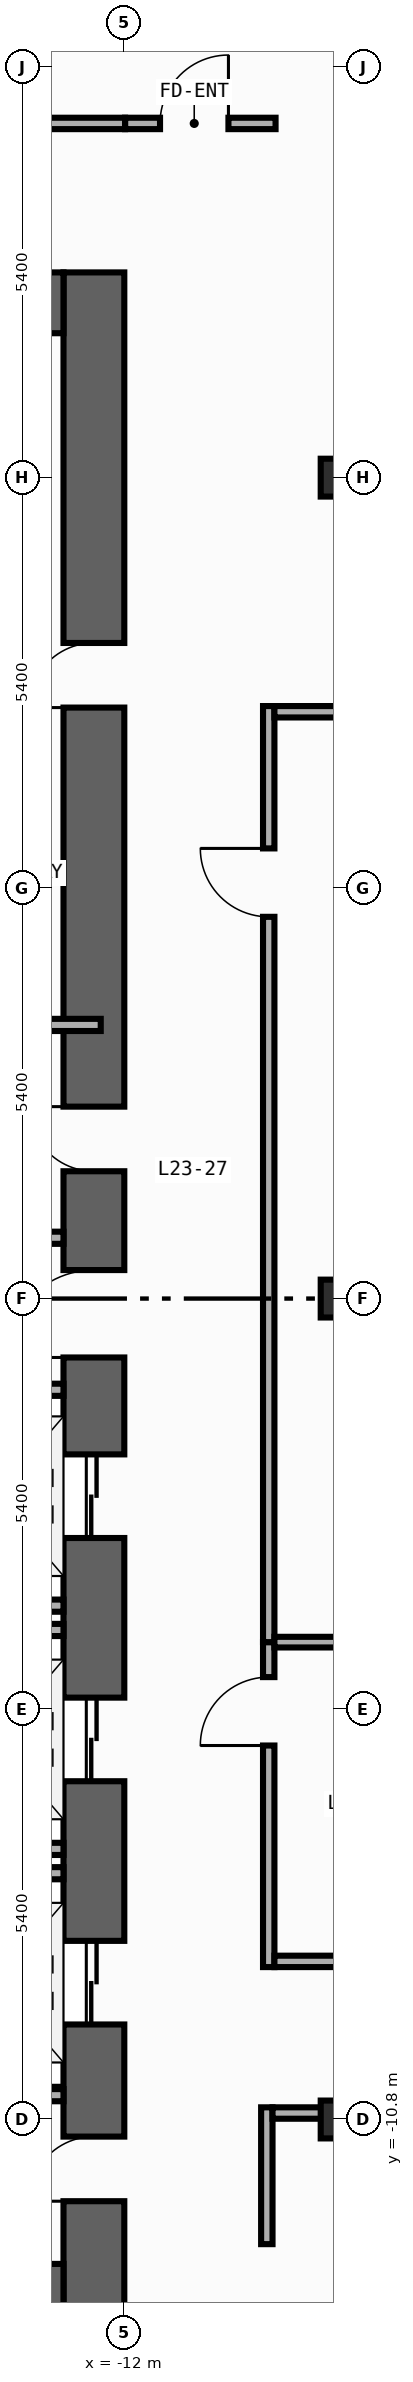
"""IFC4 building model, lengths in metres.
Left out: names, types, materials, properties, quantities, classifications, styles, units other than length and angle.
Written with IfcOpenShell. Run it as: python <this file> out.ifc"""

import sys

from ifc_helpers import new_model, si_unit, direction, frame, frame_2d, origin, origin_2d, place, context, subcontext, project, spatial, rectangle, i_section, extrude, element, fill, save


model = new_model("IFC4")
c1 = context("Model", 3, precision=1e-05, world=origin(), true_north=direction((0.0, 1.0)))
c2 = subcontext(c1, "Body", "Model", "MODEL_VIEW")
j1 = project(units=[si_unit("LENGTHUNIT", "METRE"), si_unit("PLANEANGLEUNIT", "RADIAN")], contexts=[c1])
p1 = place(None, origin())
s1 = spatial("IfcSite", under=j1, at=p1, CompositionType="ELEMENT")
p2 = place(p1, origin())
s2 = spatial("IfcBuilding", under=s1, at=p2, CompositionType="ELEMENT")
p3 = place(p2, frame((0.0, 0.0, 101.6)))
s3 = spatial("IfcBuildingStorey", under=s2, at=p3, CompositionType="ELEMENT", Elevation=101.6)
p4 = place(p3, frame((-12.4, -13.5, 0.0), z_axis=(0.0, 0.0, 1.0), x_axis=(0.0, 1.0, 0.0)))
e1 = element("IfcWall", 1, at=p4, inside=s3, PredefinedType="SHEAR", context=c2, shape_type="SweptSolid", body=[
    extrude(rectangle(XDim=27.0, YDim=0.8, at=frame_2d((13.5, 0.0))), origin(), (0.0, 0.0, 1.0), 3.94),
])
p5 = place(p4, frame((10.35, 0.0, 0.0)))
e2 = element("IfcOpeningElement", 2, at=p5, cuts=e1, PredefinedType="OPENING", context=c2, shape_type="SweptSolid", body=[
    extrude(rectangle(XDim=1.1, YDim=2.2, at=frame_2d((0.55, 1.1))), frame((0.0, 0.41, 0.0), z_axis=(0.0, -1.0, 0.0), x_axis=(1.0, 0.0, 0.0)), (0.0, 0.0, 1.0), 0.82),
])
p6 = place(p4, frame((7.15, 0.0, 0.0)))
e3 = element("IfcOpeningElement", 3, at=p6, cuts=e1, PredefinedType="OPENING", context=c2, shape_type="SweptSolid", body=[
    extrude(rectangle(XDim=1.1, YDim=2.2, at=frame_2d((0.55, 1.1))), frame((0.0, 0.41, 0.0), z_axis=(0.0, -1.0, 0.0), x_axis=(1.0, 0.0, 0.0)), (0.0, 0.0, 1.0), 0.82),
])
p7 = place(p4, frame((3.95, 0.0, 0.0)))
e4 = element("IfcOpeningElement", 4, at=p7, cuts=e1, PredefinedType="OPENING", context=c2, shape_type="SweptSolid", body=[
    extrude(rectangle(XDim=1.1, YDim=2.2, at=frame_2d((0.55, 1.1))), frame((0.0, 0.41, 0.0), z_axis=(0.0, -1.0, 0.0), x_axis=(1.0, 0.0, 0.0)), (0.0, 0.0, 1.0), 0.82),
])
p8 = place(p4, frame((15.175, 0.0, 0.0)))
e5 = element("IfcOpeningElement", 5, at=p8, cuts=e1, PredefinedType="OPENING", context=c2, shape_type="SweptSolid", body=[
    extrude(rectangle(XDim=0.85, YDim=2.1, at=frame_2d((0.425, 1.05))), frame((0.0, 0.41, 0.0), z_axis=(0.0, -1.0, 0.0), x_axis=(1.0, 0.0, 0.0)), (0.0, 0.0, 1.0), 0.82),
])
p9 = place(p4, frame((21.275, 0.0, 0.0)))
e6 = element("IfcOpeningElement", 6, at=p9, cuts=e1, PredefinedType="OPENING", context=c2, shape_type="SweptSolid", body=[
    extrude(rectangle(XDim=0.85, YDim=2.1, at=frame_2d((0.425, 1.05))), frame((0.0, 0.41, 0.0), z_axis=(0.0, -1.0, 0.0), x_axis=(1.0, 0.0, 0.0)), (0.0, 0.0, 1.0), 0.82),
])
p10 = place(p4, frame((12.725, 0.0, 0.0)))
e7 = element("IfcOpeningElement", 7, at=p10, cuts=e1, PredefinedType="OPENING", context=c2, shape_type="SweptSolid", body=[
    extrude(rectangle(XDim=1.15, YDim=2.2, at=frame_2d((0.575, 1.1))), frame((0.0, 0.41, 0.0), z_axis=(0.0, -1.0, 0.0), x_axis=(1.0, 0.0, 0.0)), (0.0, 0.0, 1.0), 0.82),
])
p11 = place(p4, frame((1.625, 0.0, 0.0)))
e8 = element("IfcOpeningElement", 8, at=p11, cuts=e1, PredefinedType="OPENING", context=c2, shape_type="SweptSolid", body=[
    extrude(rectangle(XDim=0.85, YDim=2.1, at=frame_2d((0.425, 1.05))), frame((0.0, 0.41, 0.0), z_axis=(0.0, -1.0, 0.0), x_axis=(1.0, 0.0, 0.0)), (0.0, 0.0, 1.0), 0.82),
])
for number, where, z_axis, x_axis in (
    (9, (-19.6, -13.1, 0.0), (0.0, 0.0, 1.0), (1.0, 0.0, 0.0)),
    (10, (-19.6, 13.1, 0.0), (0.0, 0.0, 1.0), (1.0, 0.0, 0.0)),
):
    element("IfcWall", number, at=place(p3, frame(where, z_axis=z_axis, x_axis=x_axis)), inside=s3, PredefinedType="SHEAR", context=c2, shape_type="SweptSolid", body=[
        extrude(rectangle(XDim=6.8, YDim=0.8, at=frame_2d((3.4, 0.0))), origin(), (0.0, 0.0, 1.0), 3.94),
    ])
for number, where, z_axis, x_axis in (
    (11, (-9.2, -10.8, 0.0), (0.0, 0.0, 1.0), (1.0, 0.0, 0.0)),
    (12, (-9.2, 0.0, 0.0), (0.0, 0.0, 1.0), (1.0, 0.0, 0.0)),
    (13, (-9.2, 10.8, 0.0), (0.0, 0.0, 1.0), (1.0, 0.0, 0.0)),
):
    element("IfcColumn", number, at=place(p3, frame(where, z_axis=z_axis, x_axis=x_axis)), inside=s3, PredefinedType="COLUMN", context=c2, shape_type="SweptSolid", body=[
        extrude(i_section(OverallWidth=0.432, OverallDepth=0.498, WebThickness=0.045, FlangeThickness=0.07, FilletRadius=0.022, at=origin_2d()), origin(), (0.0, 0.0, 1.0), 4.2),
    ])
for number, where, z_axis, x_axis in (
    (14, (-14.99, -4.04, 0.0), (0.0, 0.0, 1.0), (1.0, 0.0, 0.0)),
    (15, (-14.99, -7.24, 0.0), (0.0, 0.0, 1.0), (1.0, 0.0, 0.0)),
    (16, (-14.99, -4.36, 0.0), (0.0, 0.0, 1.0), (1.0, 0.0, 0.0)),
    (17, (-14.99, -7.56, 0.0), (0.0, 0.0, 1.0), (1.0, 0.0, 0.0)),
):
    element("IfcWall", number, at=place(p3, frame(where, z_axis=z_axis, x_axis=x_axis)), inside=s3, PredefinedType="STANDARD", context=c2, shape_type="SweptSolid", body=[
        extrude(rectangle(XDim=2.19, YDim=0.16, at=frame_2d((1.095, 0.0))), origin(), (0.0, 0.0, 1.0), 3.94),
    ])
for number, where, z_axis, x_axis in (
    (18, (-15.4, 0.8, 0.0), (0.0, 0.0, 1.0), (1.0, 0.0, 0.0)),
    (19, (-15.4, -1.2, 0.0), (0.0, 0.0, 1.0), (1.0, 0.0, 0.0)),
    (20, (-15.4, -10.48, 0.0), (0.0, 0.0, 1.0), (1.0, 0.0, 0.0)),
):
    element("IfcWall", number, at=place(p3, frame(where, z_axis=z_axis, x_axis=x_axis)), inside=s3, PredefinedType="STANDARD", context=c2, shape_type="SweptSolid", body=[
        extrude(rectangle(XDim=2.6, YDim=0.16, at=frame_2d((1.3, 0.0))), origin(), (0.0, 0.0, 1.0), 3.94),
    ])
p12 = place(p3, frame((-15.375, 3.6, 0.0), z_axis=(0.0, 0.0, 1.0), x_axis=(1.0, 0.0, 0.0)))
e21 = element("IfcWall", 21, at=p12, inside=s3, PredefinedType="PARTITIONING", context=c2, shape_type="SweptSolid", body=[
    extrude(rectangle(XDim=3.065, YDim=0.16, at=frame_2d((1.532, 0.0))), origin(), (0.0, 0.0, 1.0), 3.94),
])
p13 = place(p3, frame((-11.99, 15.46, 0.0), z_axis=(0.0, 0.0, 1.0), x_axis=(1.0, 0.0, 0.0)))
e22 = element("IfcWall", 22, at=p13, inside=s3, PredefinedType="PARTITIONING", context=c2, shape_type="SweptSolid", body=[
    extrude(rectangle(XDim=1.98, YDim=0.15, at=frame_2d((0.99, 0.0))), origin(), (0.0, 0.0, 1.0), 3.94),
])
p14 = place(p13, frame((0.46, 0.0, 0.0)))
e23 = element("IfcOpeningElement", 23, at=p14, cuts=e22, PredefinedType="OPENING", context=c2, shape_type="SweptSolid", body=[
    extrude(rectangle(XDim=0.9, YDim=2.15, at=frame_2d((0.45, 1.075))), frame((0.0, 0.085, 0.0), z_axis=(0.0, -1.0, 0.0), x_axis=(1.0, 0.0, 0.0)), (0.0, 0.0, 1.0), 0.17),
])
p15 = place(p3, frame((-10.1, -8.795, 0.0), z_axis=(0.0, 0.0, 1.0), x_axis=(0.0, 1.0, 0.0)))
e24 = element("IfcWall", 24, at=p15, inside=s3, PredefinedType="PARTITIONING", context=c2, shape_type="SweptSolid", body=[
    extrude(rectangle(XDim=4.275, YDim=0.15, at=frame_2d((2.137, 0.0))), origin(), (0.0, 0.0, 1.0), 3.94),
])
p16 = place(p15, frame((2.915, 0.0, 0.0)))
e25 = element("IfcOpeningElement", 25, at=p16, cuts=e24, PredefinedType="OPENING", context=c2, shape_type="SweptSolid", body=[
    extrude(rectangle(XDim=0.9, YDim=2.15, at=frame_2d((0.45, 1.075))), frame((0.0, 0.085, 0.0), z_axis=(0.0, -1.0, 0.0), x_axis=(1.0, 0.0, 0.0)), (0.0, 0.0, 1.0), 0.17),
])
p17 = place(p3, frame((-10.1, -4.52, 0.0), z_axis=(0.0, 0.0, 1.0), x_axis=(0.0, 1.0, 0.0)))
e26 = element("IfcWall", 26, at=p17, inside=s3, PredefinedType="PARTITIONING", context=c2, shape_type="SweptSolid", body=[
    extrude(rectangle(XDim=12.315, YDim=0.15, at=frame_2d((6.157, 0.0))), origin(), (0.0, 0.0, 1.0), 3.94),
])
p18 = place(p17, frame((9.542, 0.0, 0.0)))
e27 = element("IfcOpeningElement", 27, at=p18, cuts=e26, PredefinedType="OPENING", context=c2, shape_type="SweptSolid", body=[
    extrude(rectangle(XDim=0.9, YDim=2.15, at=frame_2d((0.45, 1.075))), frame((0.0, 0.085, 0.0), z_axis=(0.0, -1.0, 0.0), x_axis=(1.0, 0.0, 0.0)), (0.0, 0.0, 1.0), 0.17),
])
p19 = place(p3, frame((-10.125, -12.44, 0.0), z_axis=(0.0, 0.0, 1.0), x_axis=(0.0, 1.0, 0.0)))
e28 = element("IfcWall", 28, at=p19, inside=s3, PredefinedType="PARTITIONING", context=c2, shape_type="SweptSolid", body=[
    extrude(rectangle(XDim=1.8, YDim=0.15, at=frame_2d((0.9, 0.0))), origin(), (0.0, 0.0, 1.0), 3.94),
])
p20 = place(p3, frame((-10.025, 7.72, 0.0), z_axis=(0.0, 0.0, 1.0), x_axis=(1.0, 0.0, 0.0)))
e29 = element("IfcWall", 29, at=p20, inside=s3, PredefinedType="PARTITIONING", context=c2, shape_type="SweptSolid", body=[
    extrude(rectangle(XDim=5.42, YDim=0.15, at=frame_2d((2.71, 0.0))), origin(), (0.0, 0.0, 1.0), 3.94),
])
p21 = place(p20, frame((4.06, 0.0, 0.0)))
e30 = element("IfcOpeningElement", 30, at=p21, cuts=e29, PredefinedType="OPENING", context=c2, shape_type="SweptSolid", body=[
    extrude(rectangle(XDim=0.9, YDim=2.15, at=frame_2d((0.45, 1.075))), frame((0.0, 0.085, 0.0), z_axis=(0.0, -1.0, 0.0), x_axis=(1.0, 0.0, 0.0)), (0.0, 0.0, 1.0), 0.17),
])
p22 = place(p3, frame((-10.025, -8.72, 0.0), z_axis=(0.0, 0.0, 1.0), x_axis=(1.0, 0.0, 0.0)))
e31 = element("IfcWall", 31, at=p22, inside=s3, PredefinedType="PARTITIONING", context=c2, shape_type="SweptSolid", body=[
    extrude(rectangle(XDim=4.465, YDim=0.15, at=frame_2d((2.232, 0.0))), origin(), (0.0, 0.0, 1.0), 3.94),
])
p23 = place(p22, frame((3.105, 0.0, 0.0)))
e32 = element("IfcOpeningElement", 32, at=p23, cuts=e31, PredefinedType="OPENING", context=c2, shape_type="SweptSolid", body=[
    extrude(rectangle(XDim=0.9, YDim=2.15, at=frame_2d((0.45, 1.075))), frame((0.0, 0.085, 0.0), z_axis=(0.0, -1.0, 0.0), x_axis=(1.0, 0.0, 0.0)), (0.0, 0.0, 1.0), 0.17),
])
p24 = place(p3, frame((-10.05, -10.715, 0.0), z_axis=(0.0, 0.0, 1.0), x_axis=(1.0, 0.0, 0.0)))
e33 = element("IfcWall", 33, at=p24, inside=s3, PredefinedType="PARTITIONING", context=c2, shape_type="SweptSolid", body=[
    extrude(rectangle(XDim=8.265, YDim=0.15, at=frame_2d((4.133, 0.0))), origin(), (0.0, 0.0, 1.0), 3.24),
])
p25 = place(p24, frame((6.905, 0.0, 0.0)))
e34 = element("IfcOpeningElement", 34, at=p25, cuts=e33, PredefinedType="OPENING", context=c2, shape_type="SweptSolid", body=[
    extrude(rectangle(XDim=0.9, YDim=2.15, at=frame_2d((0.45, 1.075))), frame((0.0, 0.085, 0.0), z_axis=(0.0, -1.0, 0.0), x_axis=(1.0, 0.0, 0.0)), (0.0, 0.0, 1.0), 0.17),
])
p26 = place(p3, frame((-20.64, 15.46, 0.0), z_axis=(0.0, 0.0, 1.0), x_axis=(1.0, 0.0, 0.0)))
e35 = element("IfcWall", 35, at=p26, inside=s3, PredefinedType="PARTITIONING", context=c2, shape_type="SweptSolid", body=[
    extrude(rectangle(XDim=8.65, YDim=0.15, at=frame_2d((4.325, 0.0))), origin(), (0.0, 0.0, 1.0), 3.94),
])
p27 = place(p26, frame((2.871, 0.0, 0.0)))
e36 = element("IfcOpeningElement", 36, at=p27, cuts=e35, PredefinedType="OPENING", context=c2, shape_type="SweptSolid", body=[
    extrude(rectangle(XDim=0.9, YDim=2.15, at=frame_2d((0.45, 1.075))), frame((0.0, 0.085, 0.0), z_axis=(0.0, -1.0, 0.0), x_axis=(1.0, 0.0, 0.0)), (0.0, 0.0, 1.0), 0.17),
])
p28 = place(p3, frame((-10.025, -4.52, 0.0), z_axis=(0.0, 0.0, 1.0), x_axis=(1.0, 0.0, 0.0)))
e37 = element("IfcWall", 37, at=p28, inside=s3, PredefinedType="PARTITIONING", context=c2, shape_type="SweptSolid", body=[
    extrude(rectangle(XDim=4.465, YDim=0.14, at=frame_2d((2.232, 0.0))), origin(), (0.0, 0.0, 1.0), 3.94),
])
p29 = place(p5, origin())
e38 = element("IfcDoor", 38, at=p29, inside=s3, OperationType="DOUBLE_DOOR_SLIDING", PredefinedType="DOOR", context=c2, shape_type="SweptSolid", body=[
    extrude(rectangle(XDim=1.1, YDim=2.2, at=frame_2d((0.55, 1.1))), frame((0.0, 0.025, 0.0), z_axis=(0.0, -1.0, 0.0), x_axis=(1.0, 0.0, 0.0)), (0.0, 0.0, 1.0), 0.05),
])
fill(e2, e38)
p30 = place(p6, origin())
e39 = element("IfcDoor", 39, at=p30, inside=s3, OperationType="DOUBLE_DOOR_SLIDING", PredefinedType="DOOR", context=c2, shape_type="SweptSolid", body=[
    extrude(rectangle(XDim=1.1, YDim=2.2, at=frame_2d((0.55, 1.1))), frame((0.0, 0.025, 0.0), z_axis=(0.0, -1.0, 0.0), x_axis=(1.0, 0.0, 0.0)), (0.0, 0.0, 1.0), 0.05),
])
fill(e3, e39)
p31 = place(p7, origin())
e40 = element("IfcDoor", 40, at=p31, inside=s3, OperationType="DOUBLE_DOOR_SLIDING", PredefinedType="DOOR", context=c2, shape_type="SweptSolid", body=[
    extrude(rectangle(XDim=1.1, YDim=2.2, at=frame_2d((0.55, 1.1))), frame((0.0, 0.025, 0.0), z_axis=(0.0, -1.0, 0.0), x_axis=(1.0, 0.0, 0.0)), (0.0, 0.0, 1.0), 0.05),
])
fill(e4, e40)
p32 = place(p8, origin())
e41 = element("IfcDoor", 41, at=p32, inside=s3, OperationType="SINGLE_SWING_RIGHT", PredefinedType="DOOR", context=c2, shape_type="SweptSolid", body=[
    extrude(rectangle(XDim=0.85, YDim=2.1, at=frame_2d((0.425, 1.05))), frame((0.0, 0.025, 0.0), z_axis=(0.0, -1.0, 0.0), x_axis=(1.0, 0.0, 0.0)), (0.0, 0.0, 1.0), 0.05),
])
fill(e5, e41)
p33 = place(p9, origin())
e42 = element("IfcDoor", 42, at=p33, inside=s3, OperationType="SINGLE_SWING_LEFT", PredefinedType="DOOR", context=c2, shape_type="SweptSolid", body=[
    extrude(rectangle(XDim=0.85, YDim=2.1, at=frame_2d((0.425, 1.05))), frame((0.0, 0.025, 0.0), z_axis=(0.0, -1.0, 0.0), x_axis=(1.0, 0.0, 0.0)), (0.0, 0.0, 1.0), 0.05),
])
fill(e6, e42)
p34 = place(p10, origin())
e43 = element("IfcDoor", 43, at=p34, inside=s3, OperationType="SINGLE_SWING_LEFT", PredefinedType="DOOR", context=c2, shape_type="SweptSolid", body=[
    extrude(rectangle(XDim=1.15, YDim=2.2, at=frame_2d((0.575, 1.1))), frame((0.0, 0.025, 0.0), z_axis=(0.0, -1.0, 0.0), x_axis=(1.0, 0.0, 0.0)), (0.0, 0.0, 1.0), 0.05),
])
fill(e7, e43)
p35 = place(p11, origin())
e44 = element("IfcDoor", 44, at=p35, inside=s3, OperationType="SINGLE_SWING_LEFT", PredefinedType="DOOR", context=c2, shape_type="SweptSolid", body=[
    extrude(rectangle(XDim=0.85, YDim=2.1, at=frame_2d((0.425, 1.05))), frame((0.0, 0.025, 0.0), z_axis=(0.0, -1.0, 0.0), x_axis=(1.0, 0.0, 0.0)), (0.0, 0.0, 1.0), 0.05),
])
fill(e8, e44)
p36 = place(p14, origin())
e45 = element("IfcDoor", 45, at=p36, inside=s3, OperationType="SINGLE_SWING_RIGHT", PredefinedType="DOOR", context=c2, shape_type="SweptSolid", body=[
    extrude(rectangle(XDim=0.9, YDim=2.15, at=frame_2d((0.45, 1.075))), frame((0.0, 0.025, 0.0), z_axis=(0.0, -1.0, 0.0), x_axis=(1.0, 0.0, 0.0)), (0.0, 0.0, 1.0), 0.05),
])
fill(e23, e45)
p37 = place(p16, origin())
e46 = element("IfcDoor", 46, at=p37, inside=s3, OperationType="SINGLE_SWING_LEFT", PredefinedType="DOOR", context=c2, shape_type="SweptSolid", body=[
    extrude(rectangle(XDim=0.9, YDim=2.15, at=frame_2d((0.45, 1.075))), frame((0.0, 0.025, 0.0), z_axis=(0.0, -1.0, 0.0), x_axis=(1.0, 0.0, 0.0)), (0.0, 0.0, 1.0), 0.05),
])
fill(e25, e46)
p38 = place(p18, origin())
e47 = element("IfcDoor", 47, at=p38, inside=s3, OperationType="SINGLE_SWING_RIGHT", PredefinedType="DOOR", context=c2, shape_type="SweptSolid", body=[
    extrude(rectangle(XDim=0.9, YDim=2.15, at=frame_2d((0.45, 1.075))), frame((0.0, 0.025, 0.0), z_axis=(0.0, -1.0, 0.0), x_axis=(1.0, 0.0, 0.0)), (0.0, 0.0, 1.0), 0.05),
])
fill(e27, e47)
save(model, sys.argv[1])
